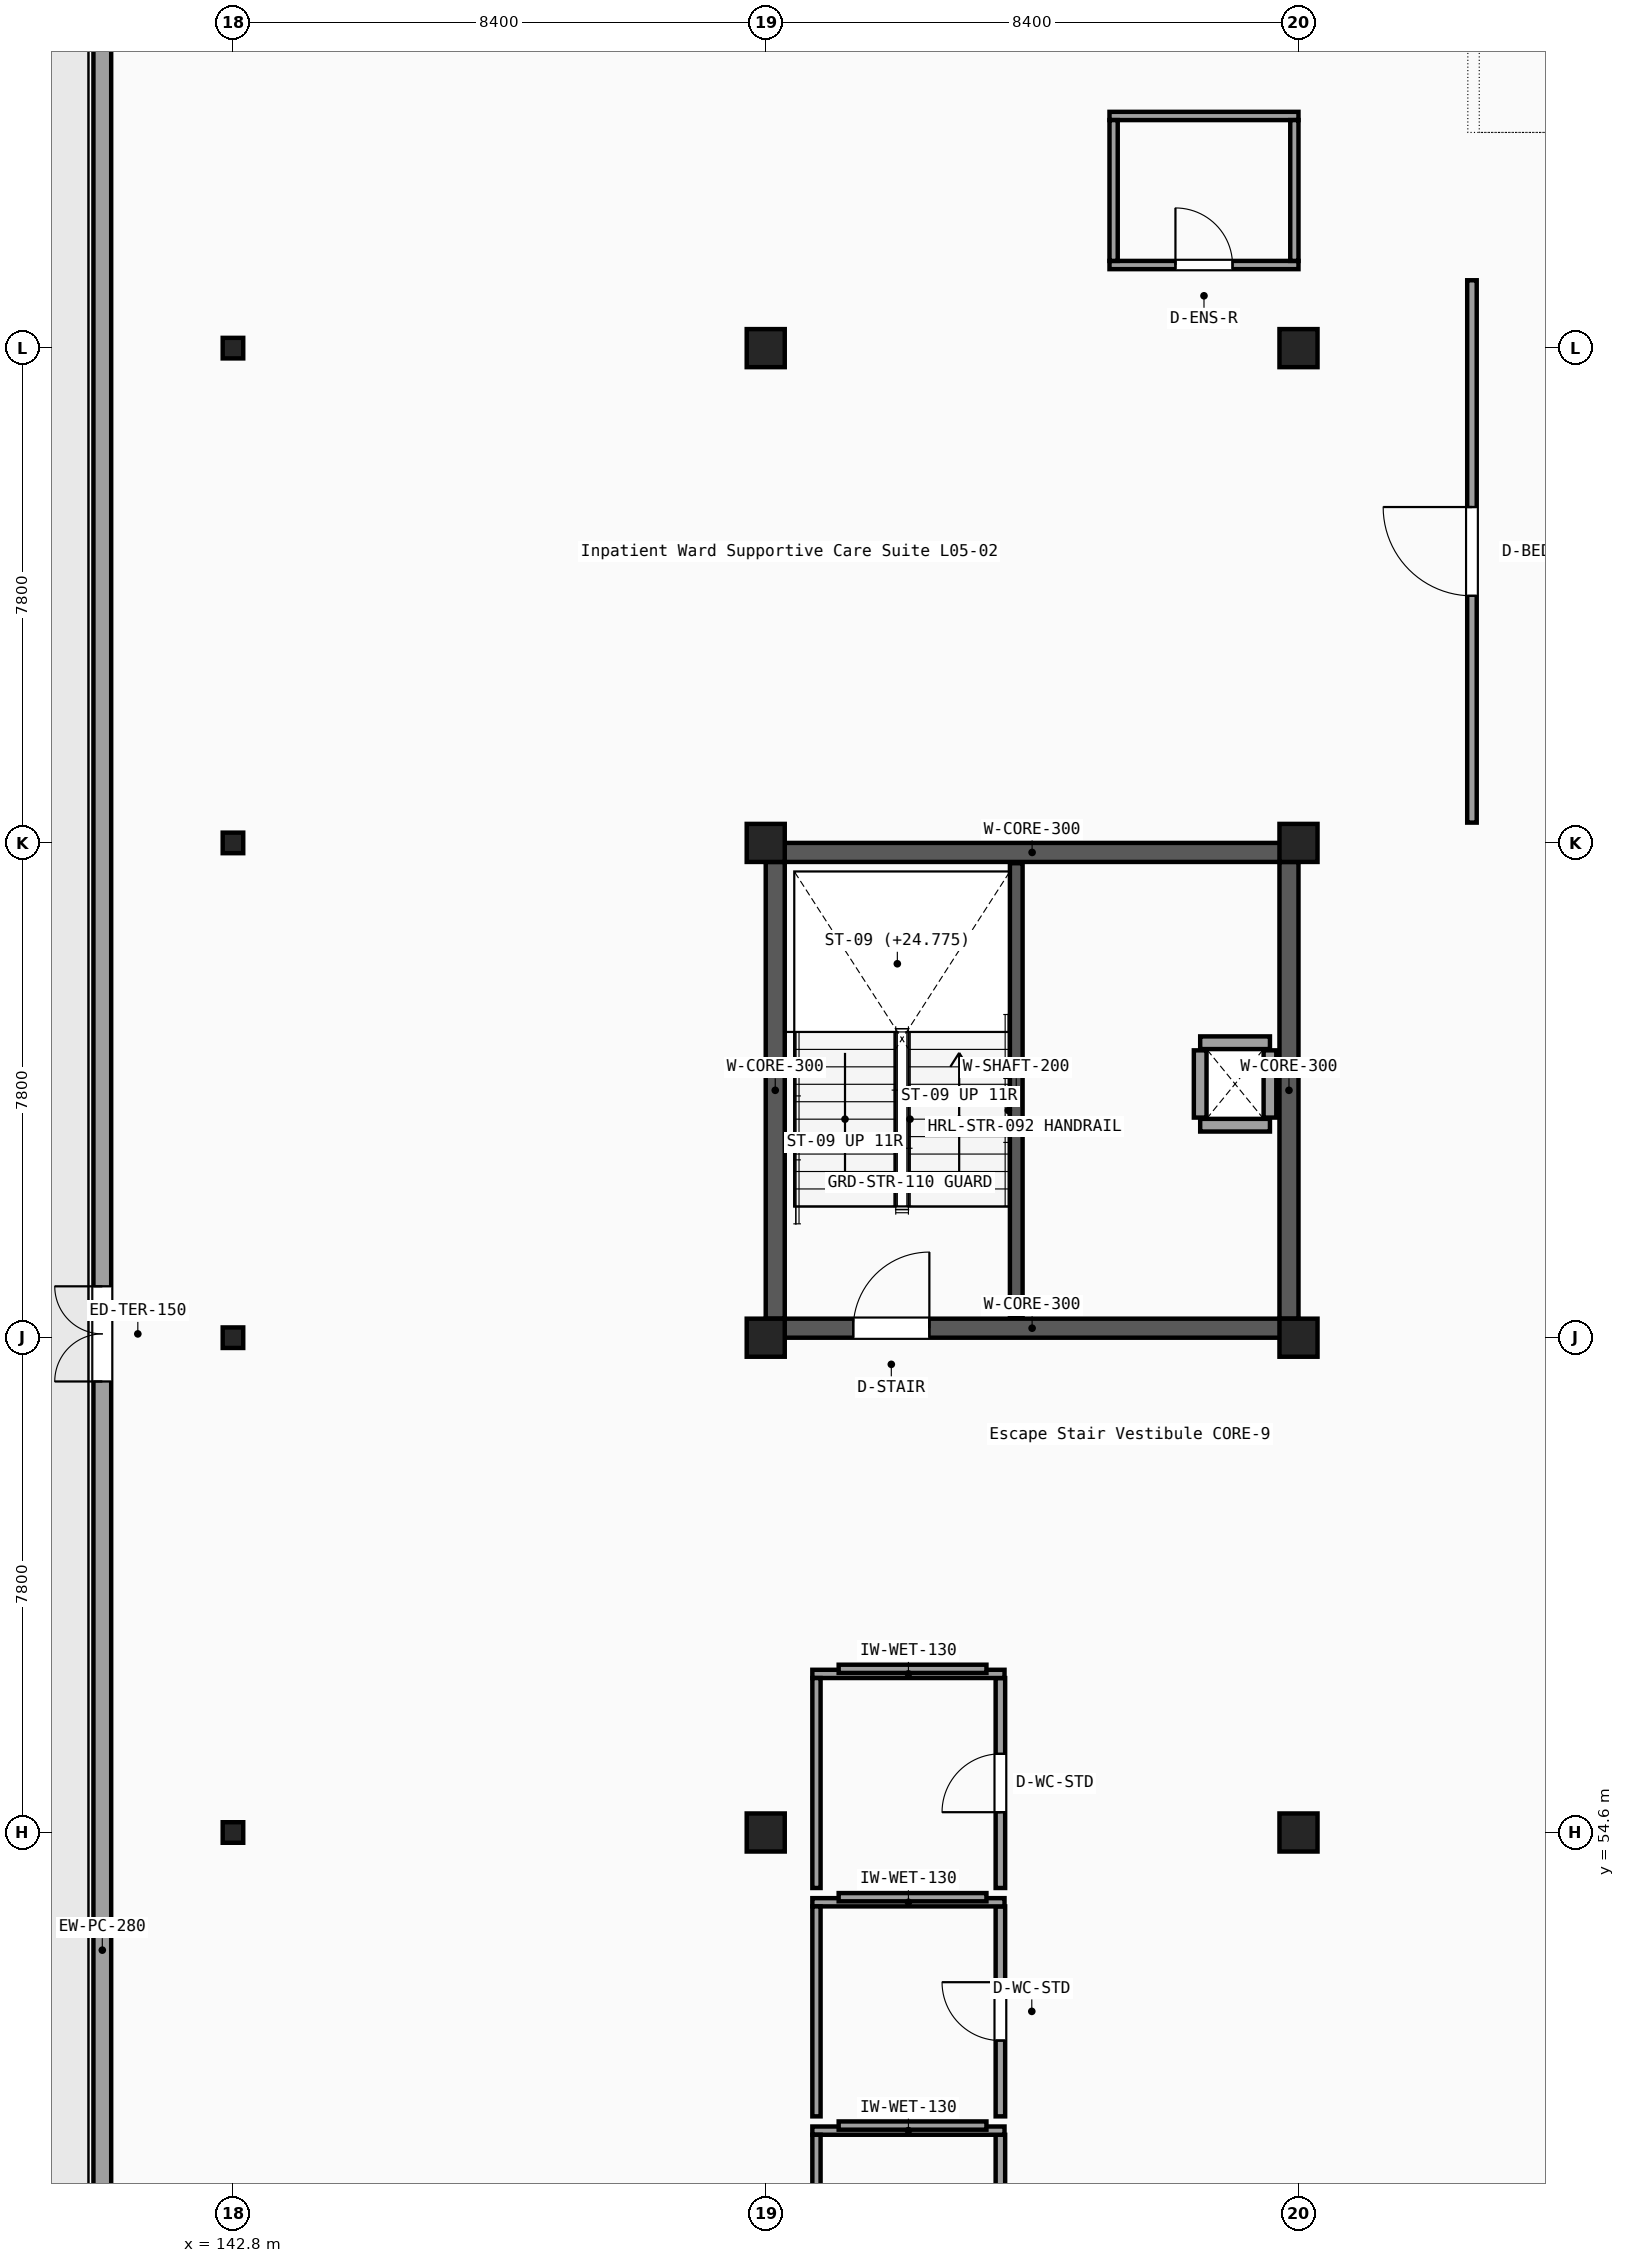
"""IFC4 building model, lengths in metres.
Left out: names, types, materials, properties, quantities, classifications, styles, units other than length and angle.
Written with IfcOpenShell. Run it as: python <this file> out.ifc"""

import sys

from ifc_helpers import new_model, si_unit, direction, frame, frame_2d, origin, origin_2d, place, context, subcontext, project, spatial, rectangle, hollow_circle, extrude, element, fill, save


model = new_model("IFC4")
c1 = context("Model", 3, precision=1e-05, world=origin(), true_north=direction((0.0, 1.0)))
c2 = subcontext(c1, "Body", "Model", "MODEL_VIEW")
j1 = project(units=[si_unit("LENGTHUNIT", "METRE"), si_unit("PLANEANGLEUNIT", "RADIAN")], contexts=[c1])
p1 = place(None, origin())
s1 = spatial("IfcSite", under=j1, at=p1, CompositionType="ELEMENT")
p2 = place(p1, origin())
s2 = spatial("IfcBuilding", under=s1, at=p2, CompositionType="ELEMENT")
p3 = place(p2, frame((0.0, 0.0, 22.95)))
s3 = spatial("IfcBuildingStorey", under=s2, at=p3, CompositionType="ELEMENT", Elevation=22.95)
for number, where, z_axis, x_axis in (
    (1, (142.8, 54.6, 0.0), (0.0, 0.0, 1.0), (1.0, 0.0, 0.0)),
    (2, (142.8, 62.4, 0.0), (0.0, 0.0, 1.0), (1.0, 0.0, 0.0)),
    (3, (142.8, 70.2, 0.0), (0.0, 0.0, 1.0), (1.0, 0.0, 0.0)),
    (4, (142.8, 78.0, 0.0), (0.0, 0.0, 1.0), (1.0, 0.0, 0.0)),
):
    element("IfcColumn", number, at=place(p3, frame(where, z_axis=z_axis, x_axis=x_axis)), inside=s3, PredefinedType="COLUMN", context=c2, shape_type="SweptSolid", body=[
        extrude(hollow_circle(Radius=0.162, WallThickness=0.016, at=origin_2d()), origin(), (0.0, 0.0, 1.0), 3.84),
    ])
for number, where, z_axis, x_axis in (
    (5, (151.2, 54.6, 0.0), (0.0, 0.0, 1.0), (1.0, 0.0, 0.0)),
    (6, (151.2, 62.4, 0.0), (0.0, 0.0, 1.0), (1.0, 0.0, 0.0)),
    (7, (151.2, 70.2, 0.0), (0.0, 0.0, 1.0), (1.0, 0.0, 0.0)),
    (8, (151.2, 78.0, 0.0), (0.0, 0.0, 1.0), (1.0, 0.0, 0.0)),
    (9, (159.6, 54.6, 0.0), (0.0, 0.0, 1.0), (1.0, 0.0, 0.0)),
    (10, (159.6, 62.4, 0.0), (0.0, 0.0, 1.0), (1.0, 0.0, 0.0)),
    (11, (159.6, 70.2, 0.0), (0.0, 0.0, 1.0), (1.0, 0.0, 0.0)),
    (12, (159.6, 78.0, 0.0), (0.0, 0.0, 1.0), (1.0, 0.0, 0.0)),
):
    element("IfcColumn", number, at=place(p3, frame(where, z_axis=z_axis, x_axis=x_axis)), inside=s3, PredefinedType="COLUMN", context=c2, shape_type="SweptSolid", body=[
        extrude(rectangle(XDim=0.6, YDim=0.6, at=origin_2d()), origin(), (0.0, 0.0, 1.0), 4.05),
    ])
p4 = place(p3, frame((140.74, 39.56, 0.0), z_axis=(0.0, 0.0, 1.0), x_axis=(0.0, 1.0, 0.0)))
e13 = element("IfcWall", 13, at=p4, inside=s3, PredefinedType="SOLIDWALL", context=c2, shape_type="SweptSolid", body=[
    extrude(rectangle(XDim=80.0, YDim=0.28, at=frame_2d((40.0, 0.0))), origin(), (0.0, 0.0, 1.0), 3.77),
])
p5 = place(p4, frame((22.15, 0.0, 0.0)))
e14 = element("IfcOpeningElement", 14, at=p5, cuts=e13, PredefinedType="OPENING", context=c2, shape_type="SweptSolid", body=[
    extrude(rectangle(XDim=1.5, YDim=2.2, at=frame_2d((0.75, 1.1))), frame((0.0, 0.15, 0.0), z_axis=(0.0, -1.0, 0.0), x_axis=(1.0, 0.0, 0.0)), (0.0, 0.0, 1.0), 0.3),
])
p6 = place(p4, frame((65.0, 0.0, 0.0)))
e15 = element("IfcOpeningElement", 15, at=p6, cuts=e13, PredefinedType="OPENING", context=c2, shape_type="SweptSolid", body=[
    extrude(rectangle(XDim=1.2, YDim=2.2, at=frame_2d((0.6, 1.1))), frame((0.0, 0.15, 0.0), z_axis=(0.0, -1.0, 0.0), x_axis=(1.0, 0.0, 0.0)), (0.0, 0.0, 1.0), 0.3),
])
p7 = place(p3, frame((151.2, 62.55, 0.0), z_axis=(0.0, 0.0, 1.0), x_axis=(1.0, 0.0, 0.0)))
e16 = element("IfcWall", 16, at=p7, inside=s3, PredefinedType="SHEAR", context=c2, shape_type="SweptSolid", body=[
    extrude(rectangle(XDim=8.4, YDim=0.3, at=frame_2d((4.2, 0.0))), origin(), (0.0, 0.0, 1.0), 3.82),
])
p8 = place(p7, frame((1.38, 0.0, 0.0)))
e17 = element("IfcOpeningElement", 17, at=p8, cuts=e16, PredefinedType="OPENING", context=c2, shape_type="SweptSolid", body=[
    extrude(rectangle(XDim=1.2, YDim=2.15, at=frame_2d((0.6, 1.075))), frame((0.0, 0.16, 0.0), z_axis=(0.0, -1.0, 0.0), x_axis=(1.0, 0.0, 0.0)), (0.0, 0.0, 1.0), 0.32),
])
p9 = place(p3, frame((151.2, 70.05, 0.0), z_axis=(0.0, 0.0, 1.0), x_axis=(1.0, 0.0, 0.0)))
e18 = element("IfcWall", 18, at=p9, inside=s3, PredefinedType="SHEAR", context=c2, shape_type="SweptSolid", body=[
    extrude(rectangle(XDim=8.4, YDim=0.3, at=frame_2d((4.2, 0.0))), origin(), (0.0, 0.0, 1.0), 3.82),
])
for number, where, z_axis, x_axis in (
    (19, (151.35, 62.7, 0.0), (0.0, 0.0, 1.0), (0.0, 1.0, 0.0)),
    (20, (159.45, 62.7, 0.0), (0.0, 0.0, 1.0), (0.0, 1.0, 0.0)),
):
    element("IfcWall", number, at=place(p3, frame(where, z_axis=z_axis, x_axis=x_axis)), inside=s3, PredefinedType="SHEAR", context=c2, shape_type="SweptSolid", body=[
        extrude(rectangle(XDim=7.2, YDim=0.3, at=frame_2d((3.6, 0.0))), origin(), (0.0, 0.0, 1.0), 3.82),
    ])
p10 = place(p3, frame((155.15, 62.72, 0.0), z_axis=(0.0, 0.0, 1.0), x_axis=(0.0, 1.0, 0.0)))
e21 = element("IfcWall", 21, at=p10, inside=s3, PredefinedType="SHEAR", context=c2, shape_type="SweptSolid", body=[
    extrude(rectangle(XDim=7.16, YDim=0.2, at=frame_2d((3.58, 0.0))), origin(), (0.0, 0.0, 1.0), 3.82),
])
for number, where, z_axis, x_axis in (
    (22, (158.05, 65.75, 0.0), (0.0, 0.0, 1.0), (1.0, 0.0, 0.0)),
    (23, (158.05, 67.05, 0.0), (0.0, 0.0, 1.0), (1.0, 0.0, 0.0)),
):
    element("IfcWall", number, at=place(p3, frame(where, z_axis=z_axis, x_axis=x_axis)), inside=s3, PredefinedType="PARTITIONING", context=c2, shape_type="SweptSolid", body=[
        extrude(rectangle(XDim=1.1, YDim=0.2, at=frame_2d((0.55, 0.0))), origin(), (0.0, 0.0, 1.0), 3.25),
    ])
for number, where, z_axis, x_axis in (
    (24, (158.05, 65.87, 0.0), (0.0, 0.0, 1.0), (0.0, 1.0, 0.0)),
    (25, (159.15, 65.87, 0.0), (0.0, 0.0, 1.0), (0.0, 1.0, 0.0)),
):
    element("IfcWall", number, at=place(p3, frame(where, z_axis=z_axis, x_axis=x_axis)), inside=s3, PredefinedType="PARTITIONING", context=c2, shape_type="SweptSolid", body=[
        extrude(rectangle(XDim=1.06, YDim=0.2, at=frame_2d((0.53, 0.0))), origin(), (0.0, 0.0, 1.0), 3.25),
    ])
p11 = place(p3, frame((154.9, 46.865, 0.0), z_axis=(0.0, 0.0, 1.0), x_axis=(0.0, 1.0, 0.0)))
e26 = element("IfcWall", 26, at=p11, inside=s3, PredefinedType="PARTITIONING", context=c2, shape_type="SweptSolid", body=[
    extrude(rectangle(XDim=2.97, YDim=0.15, at=frame_2d((1.485, 0.0))), origin(), (0.0, 0.0, 1.0), 3.25),
])
p12 = place(p11, frame((0.985, 0.0, 0.0)))
e27 = element("IfcOpeningElement", 27, at=p12, cuts=e26, PredefinedType="OPENING", context=c2, shape_type="SweptSolid", body=[
    extrude(rectangle(XDim=1.0, YDim=2.15, at=frame_2d((0.5, 1.075))), frame((0.0, 0.085, 0.0), z_axis=(0.0, -1.0, 0.0), x_axis=(1.0, 0.0, 0.0)), (0.0, 0.0, 1.0), 0.17),
])
p13 = place(p3, frame((151.935, 49.9, 0.0), z_axis=(0.0, 0.0, 1.0), x_axis=(1.0, 0.0, 0.0)))
e28 = element("IfcWall", 28, at=p13, inside=s3, PredefinedType="PARTITIONING", context=c2, shape_type="SweptSolid", body=[
    extrude(rectangle(XDim=3.03, YDim=0.13, at=frame_2d((1.515, 0.0))), origin(), (0.0, 0.0, 1.0), 3.77),
])
p14 = place(p3, frame((152.0, 46.865, 0.0), z_axis=(0.0, 0.0, 1.0), x_axis=(0.0, 1.0, 0.0)))
e29 = element("IfcWall", 29, at=p14, inside=s3, PredefinedType="PARTITIONING", context=c2, shape_type="SweptSolid", body=[
    extrude(rectangle(XDim=2.97, YDim=0.13, at=frame_2d((1.485, 0.0))), origin(), (0.0, 0.0, 1.0), 3.25),
])
p15 = place(p3, frame((152.35, 49.98, 0.0), z_axis=(0.0, 0.0, 1.0), x_axis=(1.0, 0.0, 0.0)))
e30 = element("IfcWall", 30, at=p15, inside=s3, PredefinedType="PARTITIONING", context=c2, shape_type="SweptSolid", body=[
    extrude(rectangle(XDim=2.33, YDim=0.13, at=frame_2d((1.165, 0.0))), origin(), (0.0, 0.0, 1.0), 3.77),
])
p16 = place(p3, frame((154.9, 50.125, 0.0), z_axis=(0.0, 0.0, 1.0), x_axis=(0.0, 1.0, 0.0)))
e31 = element("IfcWall", 31, at=p16, inside=s3, PredefinedType="PARTITIONING", context=c2, shape_type="SweptSolid", body=[
    extrude(rectangle(XDim=3.31, YDim=0.15, at=frame_2d((1.655, 0.0))), origin(), (0.0, 0.0, 1.0), 3.77),
])
p17 = place(p16, frame((1.195, 0.0, 0.0)))
e32 = element("IfcOpeningElement", 32, at=p17, cuts=e31, PredefinedType="OPENING", context=c2, shape_type="SweptSolid", body=[
    extrude(rectangle(XDim=0.92, YDim=2.15, at=frame_2d((0.46, 1.075))), frame((0.0, 0.085, 0.0), z_axis=(0.0, -1.0, 0.0), x_axis=(1.0, 0.0, 0.0)), (0.0, 0.0, 1.0), 0.17),
])
p18 = place(p3, frame((151.935, 53.5, 0.0), z_axis=(0.0, 0.0, 1.0), x_axis=(1.0, 0.0, 0.0)))
e33 = element("IfcWall", 33, at=p18, inside=s3, PredefinedType="PARTITIONING", context=c2, shape_type="SweptSolid", body=[
    extrude(rectangle(XDim=3.03, YDim=0.13, at=frame_2d((1.515, 0.0))), origin(), (0.0, 0.0, 1.0), 3.77),
])
p19 = place(p3, frame((152.0, 50.125, 0.0), z_axis=(0.0, 0.0, 1.0), x_axis=(0.0, 1.0, 0.0)))
e34 = element("IfcWall", 34, at=p19, inside=s3, PredefinedType="PARTITIONING", context=c2, shape_type="SweptSolid", body=[
    extrude(rectangle(XDim=3.31, YDim=0.13, at=frame_2d((1.655, 0.0))), origin(), (0.0, 0.0, 1.0), 3.77),
])
p20 = place(p3, frame((152.35, 53.58, 0.0), z_axis=(0.0, 0.0, 1.0), x_axis=(1.0, 0.0, 0.0)))
e35 = element("IfcWall", 35, at=p20, inside=s3, PredefinedType="PARTITIONING", context=c2, shape_type="SweptSolid", body=[
    extrude(rectangle(XDim=2.33, YDim=0.13, at=frame_2d((1.165, 0.0))), origin(), (0.0, 0.0, 1.0), 3.77),
])
p21 = place(p3, frame((154.9, 53.725, 0.0), z_axis=(0.0, 0.0, 1.0), x_axis=(0.0, 1.0, 0.0)))
e36 = element("IfcWall", 36, at=p21, inside=s3, PredefinedType="PARTITIONING", context=c2, shape_type="SweptSolid", body=[
    extrude(rectangle(XDim=3.31, YDim=0.15, at=frame_2d((1.655, 0.0))), origin(), (0.0, 0.0, 1.0), 3.25),
])
p22 = place(p21, frame((1.195, 0.0, 0.0)))
e37 = element("IfcOpeningElement", 37, at=p22, cuts=e36, PredefinedType="OPENING", context=c2, shape_type="SweptSolid", body=[
    extrude(rectangle(XDim=0.92, YDim=2.15, at=frame_2d((0.46, 1.075))), frame((0.0, 0.085, 0.0), z_axis=(0.0, -1.0, 0.0), x_axis=(1.0, 0.0, 0.0)), (0.0, 0.0, 1.0), 0.17),
])
p23 = place(p3, frame((151.935, 57.1, 0.0), z_axis=(0.0, 0.0, 1.0), x_axis=(1.0, 0.0, 0.0)))
e38 = element("IfcWall", 38, at=p23, inside=s3, PredefinedType="PARTITIONING", context=c2, shape_type="SweptSolid", body=[
    extrude(rectangle(XDim=3.03, YDim=0.13, at=frame_2d((1.515, 0.0))), origin(), (0.0, 0.0, 1.0), 3.77),
])
p24 = place(p3, frame((152.0, 53.725, 0.0), z_axis=(0.0, 0.0, 1.0), x_axis=(0.0, 1.0, 0.0)))
e39 = element("IfcWall", 39, at=p24, inside=s3, PredefinedType="PARTITIONING", context=c2, shape_type="SweptSolid", body=[
    extrude(rectangle(XDim=3.31, YDim=0.13, at=frame_2d((1.655, 0.0))), origin(), (0.0, 0.0, 1.0), 3.25),
])
p25 = place(p3, frame((152.35, 57.18, 0.0), z_axis=(0.0, 0.0, 1.0), x_axis=(1.0, 0.0, 0.0)))
e40 = element("IfcWall", 40, at=p25, inside=s3, PredefinedType="PARTITIONING", context=c2, shape_type="SweptSolid", body=[
    extrude(rectangle(XDim=2.33, YDim=0.13, at=frame_2d((1.165, 0.0))), origin(), (0.0, 0.0, 1.0), 3.77),
])
p26 = place(p3, frame((162.335, 70.52, 0.0), z_axis=(0.0, 0.0, 1.0), x_axis=(0.0, 1.0, 0.0)))
e41 = element("IfcWall", 41, at=p26, inside=s3, PredefinedType="PARTITIONING", context=c2, shape_type="SweptSolid", body=[
    extrude(rectangle(XDim=8.55, YDim=0.15, at=frame_2d((4.275, 0.0))), origin(), (0.0, 0.0, 1.0), 3.25),
])
p27 = place(p26, frame((3.575, 0.0, 0.0)))
e42 = element("IfcOpeningElement", 42, at=p27, cuts=e41, PredefinedType="OPENING", context=c2, shape_type="SweptSolid", body=[
    extrude(rectangle(XDim=1.4, YDim=2.2, at=frame_2d((0.7, 1.1))), frame((0.0, 0.085, 0.0), z_axis=(0.0, -1.0, 0.0), x_axis=(1.0, 0.0, 0.0)), (0.0, 0.0, 1.0), 0.17),
])
p28 = place(p3, frame((156.62, 79.31, 0.0), z_axis=(0.0, 0.0, 1.0), x_axis=(1.0, 0.0, 0.0)))
e43 = element("IfcWall", 43, at=p28, inside=s3, PredefinedType="PARTITIONING", context=c2, shape_type="SweptSolid", body=[
    extrude(rectangle(XDim=2.98, YDim=0.13, at=frame_2d((1.49, 0.0))), origin(), (0.0, 0.0, 1.0), 3.51),
])
p29 = place(p28, frame((1.04, 0.0, 0.0)))
e44 = element("IfcOpeningElement", 44, at=p29, cuts=e43, PredefinedType="OPENING", context=c2, shape_type="SweptSolid", body=[
    extrude(rectangle(XDim=0.9, YDim=2.1, at=frame_2d((0.45, 1.05))), frame((0.0, 0.075, 0.0), z_axis=(0.0, -1.0, 0.0), x_axis=(1.0, 0.0, 0.0)), (0.0, 0.0, 1.0), 0.15),
])
p30 = place(p3, frame((156.62, 81.66, 0.0), z_axis=(0.0, 0.0, 1.0), x_axis=(1.0, 0.0, 0.0)))
e45 = element("IfcWall", 45, at=p30, inside=s3, PredefinedType="PARTITIONING", context=c2, shape_type="SweptSolid", body=[
    extrude(rectangle(XDim=2.98, YDim=0.13, at=frame_2d((1.49, 0.0))), origin(), (0.0, 0.0, 1.0), 3.51),
])
p31 = place(p3, frame((156.685, 79.375, 0.0), z_axis=(0.0, 0.0, 1.0), x_axis=(0.0, 1.0, 0.0)))
e46 = element("IfcWall", 46, at=p31, inside=s3, PredefinedType="PARTITIONING", context=c2, shape_type="SweptSolid", body=[
    extrude(rectangle(XDim=2.22, YDim=0.13, at=frame_2d((1.11, 0.0))), origin(), (0.0, 0.0, 1.0), 3.77),
])
p32 = place(p3, frame((159.535, 79.375, 0.0), z_axis=(0.0, 0.0, 1.0), x_axis=(0.0, 1.0, 0.0)))
e47 = element("IfcWall", 47, at=p32, inside=s3, PredefinedType="PARTITIONING", context=c2, shape_type="SweptSolid", body=[
    extrude(rectangle(XDim=2.22, YDim=0.13, at=frame_2d((1.11, 0.0))), origin(), (0.0, 0.0, 1.0), 3.51),
])
p33 = place(p5, origin())
e48 = element("IfcDoor", 48, at=p33, inside=s3, OperationType="DOUBLE_DOOR_SINGLE_SWING", PredefinedType="DOOR", context=c2, shape_type="SweptSolid", body=[
    extrude(rectangle(XDim=1.5, YDim=2.2, at=frame_2d((0.75, 1.1))), frame((0.0, 0.025, 0.0), z_axis=(0.0, -1.0, 0.0), x_axis=(1.0, 0.0, 0.0)), (0.0, 0.0, 1.0), 0.05),
])
fill(e14, e48)
p34 = place(p8, origin())
e49 = element("IfcDoor", 49, at=p34, inside=s3, OperationType="SINGLE_SWING_RIGHT", PredefinedType="DOOR", context=c2, shape_type="SweptSolid", body=[
    extrude(rectangle(XDim=1.2, YDim=2.15, at=frame_2d((0.6, 1.075))), frame((0.0, 0.025, 0.0), z_axis=(0.0, -1.0, 0.0), x_axis=(1.0, 0.0, 0.0)), (0.0, 0.0, 1.0), 0.05),
])
fill(e17, e49)
p35 = place(p17, origin())
e50 = element("IfcDoor", 50, at=p35, inside=s3, OperationType="SINGLE_SWING_RIGHT", PredefinedType="DOOR", context=c2, shape_type="SweptSolid", body=[
    extrude(rectangle(XDim=0.92, YDim=2.15, at=frame_2d((0.46, 1.075))), frame((0.0, 0.025, 0.0), z_axis=(0.0, -1.0, 0.0), x_axis=(1.0, 0.0, 0.0)), (0.0, 0.0, 1.0), 0.05),
])
fill(e32, e50)
p36 = place(p22, origin())
e51 = element("IfcDoor", 51, at=p36, inside=s3, OperationType="SINGLE_SWING_LEFT", PredefinedType="DOOR", context=c2, shape_type="SweptSolid", body=[
    extrude(rectangle(XDim=0.92, YDim=2.15, at=frame_2d((0.46, 1.075))), frame((0.0, 0.025, 0.0), z_axis=(0.0, -1.0, 0.0), x_axis=(1.0, 0.0, 0.0)), (0.0, 0.0, 1.0), 0.05),
])
fill(e37, e51)
p37 = place(p27, origin())
e52 = element("IfcDoor", 52, at=p37, inside=s3, OperationType="SINGLE_SWING_RIGHT", PredefinedType="DOOR", context=c2, shape_type="SweptSolid", body=[
    extrude(rectangle(XDim=1.4, YDim=2.2, at=frame_2d((0.7, 1.1))), frame((0.0, 0.025, 0.0), z_axis=(0.0, -1.0, 0.0), x_axis=(1.0, 0.0, 0.0)), (0.0, 0.0, 1.0), 0.05),
])
fill(e42, e52)
p38 = place(p29, origin())
e53 = element("IfcDoor", 53, at=p38, inside=s3, OperationType="SINGLE_SWING_LEFT", PredefinedType="DOOR", context=c2, shape_type="SweptSolid", body=[
    extrude(rectangle(XDim=0.9, YDim=2.1, at=frame_2d((0.45, 1.05))), frame((0.0, 0.025, 0.0), z_axis=(0.0, -1.0, 0.0), x_axis=(1.0, 0.0, 0.0)), (0.0, 0.0, 1.0), 0.05),
])
fill(e44, e53)
save(model, sys.argv[1])
